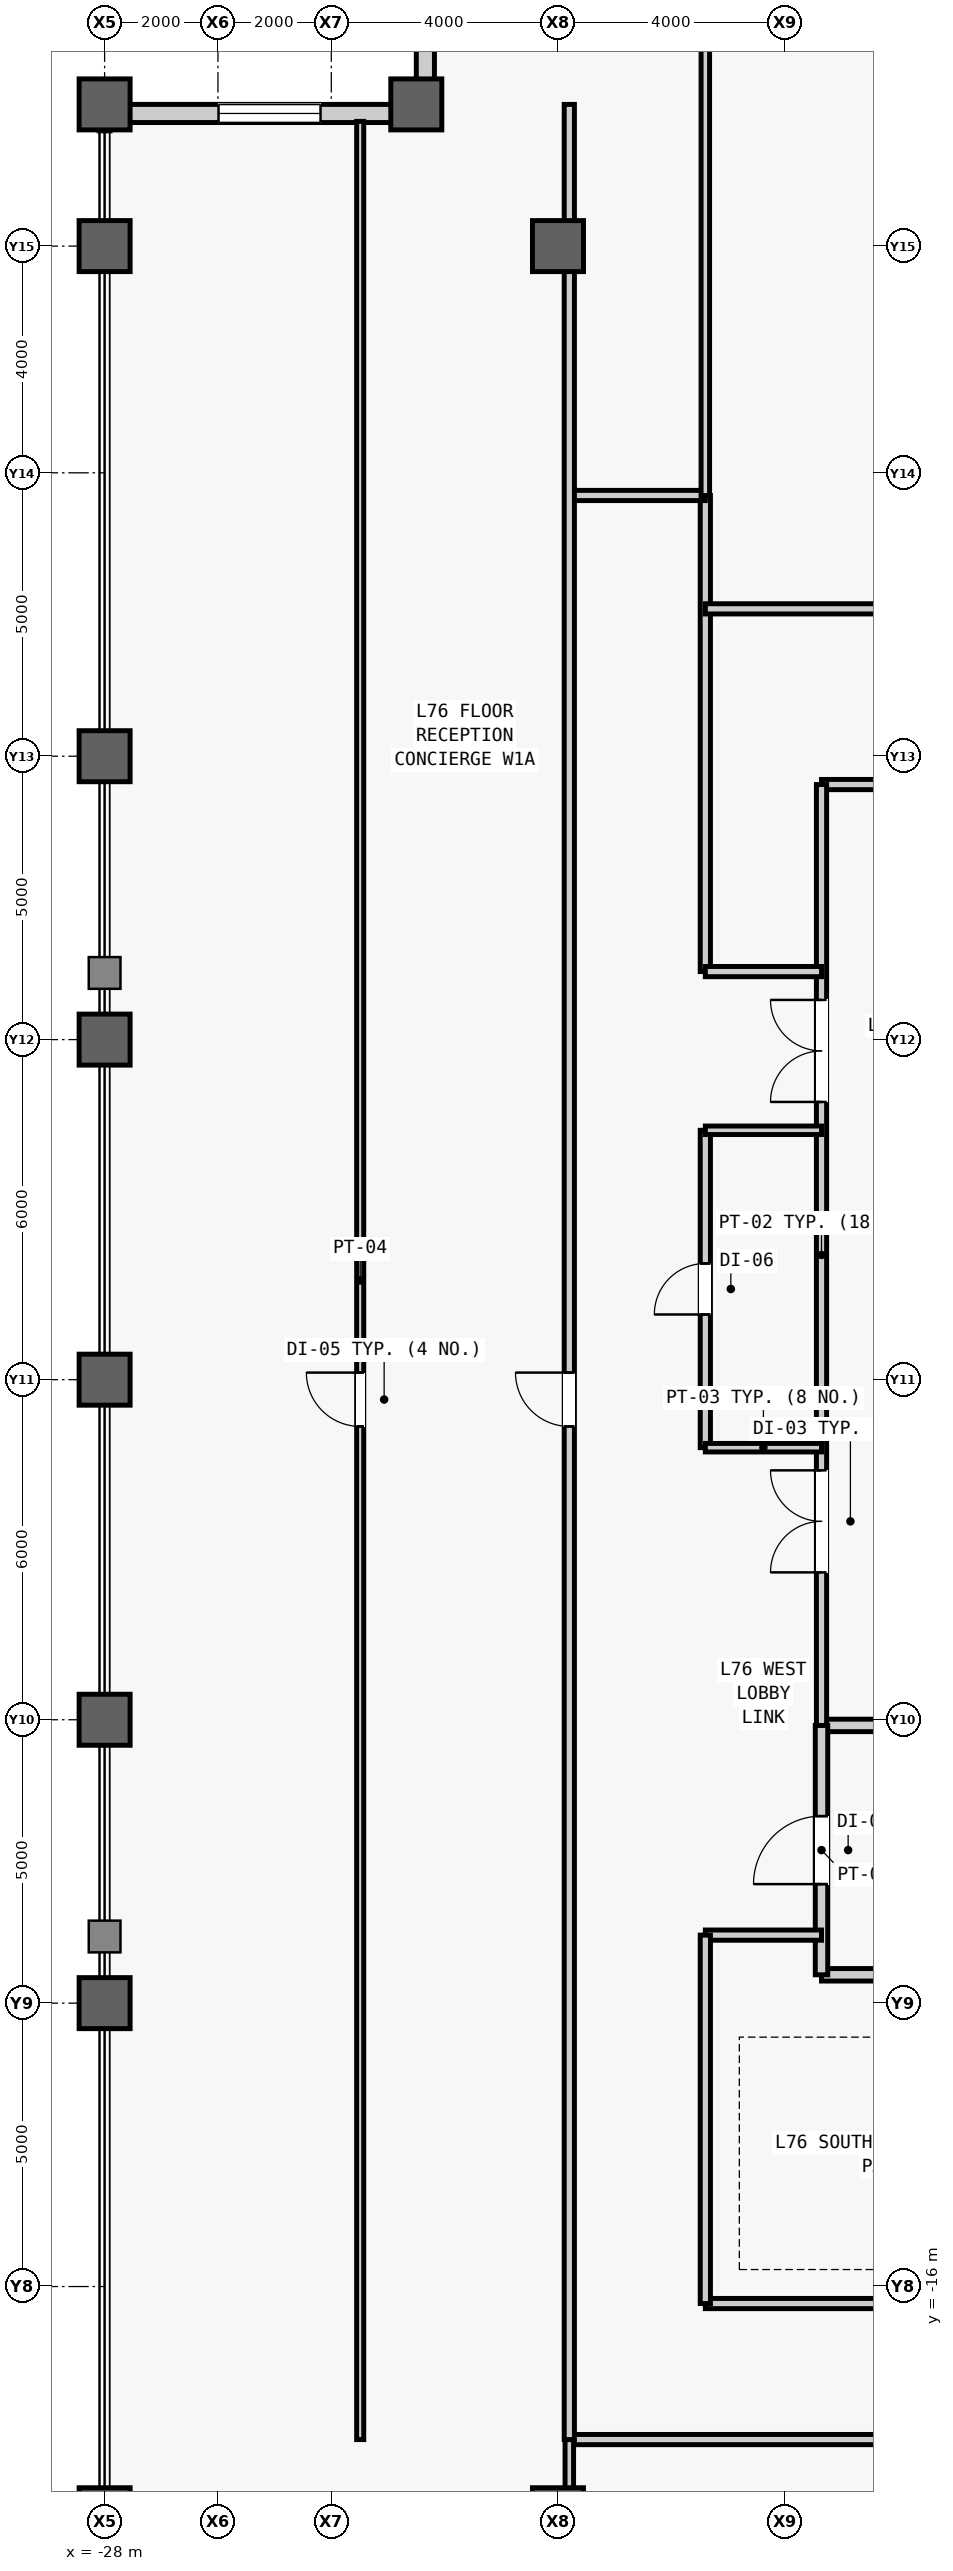
"""IFC4 building model, lengths in metres.
Left out: names, types, materials, properties, quantities, classifications, styles, units other than length and angle.
Written with IfcOpenShell. Run it as: python <this file> out.ifc"""

import sys

from ifc_helpers import new_model, si_unit, direction, frame, frame_2d, origin, origin_2d, place, context, subcontext, project, spatial, rectangle, hollow_rectangle, extrude, source, transform, mapped, element, fill, save


model = new_model("IFC4")
c1 = context("Model", 3, precision=1e-05, world=origin(), true_north=direction((0.0, 1.0)))
c2 = subcontext(c1, "Body", "Model", "MODEL_VIEW")
j1 = project(units=[si_unit("LENGTHUNIT", "METRE"), si_unit("PLANEANGLEUNIT", "RADIAN")], contexts=[c1])
p1 = place(None, origin())
s1 = spatial("IfcSite", under=j1, at=p1, CompositionType="ELEMENT")
p2 = place(p1, origin())
s2 = spatial("IfcBuilding", under=s1, at=p2, CompositionType="ELEMENT")
p3 = place(p2, frame((0.0, 0.0, 321.5)))
s3 = spatial("IfcBuildingStorey", under=s2, at=p3, CompositionType="ELEMENT", Elevation=321.5)
m1 = source(origin(), c2, "Body", "SweptSolid", [
    extrude(hollow_rectangle(XDim=0.9, YDim=0.9, WallThickness=0.05, at=origin_2d()), origin(), (0.0, 0.0, 1.0), 4.8),
])
for number, where, z_axis, x_axis in (
    (1, (-28.0, -20.0, 0.0), (0.0, 0.0, 1.0), (1.0, 0.0, 0.0)),
    (2, (-28.0, -11.0, 0.0), (0.0, 0.0, 1.0), (1.0, 0.0, 0.0)),
    (3, (-28.0, -6.0, 0.0), (0.0, 0.0, 1.0), (1.0, 0.0, 0.0)),
    (4, (-28.0, 0.0, 0.0), (0.0, 0.0, 1.0), (1.0, 0.0, 0.0)),
    (5, (-28.0, 6.0, 0.0), (0.0, 0.0, 1.0), (1.0, 0.0, 0.0)),
    (6, (-28.0, 11.0, 0.0), (0.0, 0.0, 1.0), (1.0, 0.0, 0.0)),
    (7, (-28.0, 20.0, 0.0), (0.0, 0.0, 1.0), (1.0, 0.0, 0.0)),
    (8, (-28.0, 22.5, 0.0), (0.0, 0.0, 1.0), (1.0, 0.0, 0.0)),
    (9, (-22.5, 22.5, 0.0), (0.0, 0.0, 1.0), (1.0, 0.0, 0.0)),
    (10, (-20.0, -20.0, 0.0), (0.0, 0.0, 1.0), (1.0, 0.0, 0.0)),
    (11, (-20.0, 20.0, 0.0), (0.0, 0.0, 1.0), (1.0, 0.0, 0.0)),
):
    element("IfcColumn", number, at=place(p3, frame(where, z_axis=z_axis, x_axis=x_axis)), inside=s3, PredefinedType="COLUMN", context=c2, shape_type="MappedRepresentation", body=[
        mapped(m1, transform((0.0, 0.0, 0.0), scale=1.0)),
    ])
m2 = source(origin(), c2, "Body", "SweptSolid", [
    extrude(rectangle(XDim=5.18, YDim=0.32, at=frame_2d((2.59, 0.0))), origin(), (0.0, 0.0, 1.0), 3.991),
])
p4 = place(p3, frame((-22.34, 22.5, 0.0), z_axis=(0.0, 0.0, 1.0), x_axis=(0.0, 1.0, 0.0)))
e12 = element("IfcWall", 12, at=p4, inside=s3, PredefinedType="STANDARD", context=c2, shape_type="MappedRepresentation", body=[
    mapped(m2, transform((0.0, 0.0, 0.0), scale=1.0)),
])
m3 = source(origin(), c2, "Body", "SweptSolid", [
    extrude(rectangle(XDim=1.8, YDim=2.4, at=frame_2d((0.9, 1.2))), frame((0.0, 0.17, 0.0), z_axis=(0.0, -1.0, 0.0), x_axis=(1.0, 0.0, 0.0)), (0.0, 0.0, 1.0), 0.34),
])
p5 = place(p4, frame((1.69, 0.0, 0.7)))
e13 = element("IfcOpeningElement", 13, at=p5, cuts=e12, PredefinedType="OPENING", context=c2, shape_type="MappedRepresentation", body=[
    mapped(m3, transform((0.0, 0.0, 0.0), scale=1.0)),
])
p6 = place(p3, frame((-22.5, 22.34, 0.0), z_axis=(0.0, 0.0, 1.0), x_axis=(-1.0, 0.0, 0.0)))
e14 = element("IfcWall", 14, at=p6, inside=s3, PredefinedType="STANDARD", context=c2, shape_type="MappedRepresentation", body=[
    mapped(m2, transform((0.0, 0.0, 0.0), scale=1.0)),
])
p7 = place(p6, frame((1.69, 0.0, 0.7)))
e15 = element("IfcOpeningElement", 15, at=p7, cuts=e14, PredefinedType="OPENING", context=c2, shape_type="MappedRepresentation", body=[
    mapped(m3, transform((0.0, 0.0, 0.0), scale=1.0)),
])
m4 = source(origin(), c2, "Body", "SweptSolid", [
    extrude(rectangle(XDim=4.05, YDim=0.22, at=frame_2d((2.025, 0.0))), origin(), (0.0, 0.0, 1.0), 4.54),
])
p8 = place(p3, frame((-15.35, -10.5, 0.0), z_axis=(0.0, 0.0, 1.0), x_axis=(1.0, 0.0, 0.0)))
e16 = element("IfcWall", 16, at=p8, inside=s3, PredefinedType="PARTITIONING", context=c2, shape_type="MappedRepresentation", body=[
    mapped(m4, transform((0.0, 0.0, 0.0), scale=1.0)),
])
m5 = source(origin(), c2, "Body", "SweptSolid", [
    extrude(rectangle(XDim=4.05, YDim=0.22, at=frame_2d((2.025, 0.0))), origin(), (0.0, 0.0, 1.0), 2.74),
])
p9 = place(p3, frame((-15.35, -6.1, 0.0), z_axis=(0.0, 0.0, 1.0), x_axis=(1.0, 0.0, 0.0)))
e17 = element("IfcWall", 17, at=p9, inside=s3, PredefinedType="PARTITIONING", context=c2, shape_type="MappedRepresentation", body=[
    mapped(m5, transform((0.0, 0.0, 0.0), scale=1.0)),
])
m6 = source(origin(), c2, "Body", "SweptSolid", [
    extrude(rectangle(XDim=4.4, YDim=0.22, at=frame_2d((2.2, 0.0))), origin(), (0.0, 0.0, 1.0), 4.54),
])
p10 = place(p3, frame((-15.35, -10.5, 0.0), z_axis=(0.0, 0.0, 1.0), x_axis=(0.0, 1.0, 0.0)))
e18 = element("IfcWall", 18, at=p10, inside=s3, PredefinedType="PARTITIONING", context=c2, shape_type="MappedRepresentation", body=[
    mapped(m6, transform((0.0, 0.0, 0.0), scale=1.0)),
])
m7 = source(origin(), c2, "Body", "SweptSolid", [
    extrude(rectangle(XDim=1.2, YDim=2.2, at=frame_2d((0.6, 1.1))), frame((0.0, 0.12, 0.0), z_axis=(0.0, -1.0, 0.0), x_axis=(1.0, 0.0, 0.0)), (0.0, 0.0, 1.0), 0.24),
])
p11 = place(p10, frame((1.6, 0.0, 0.0)))
e19 = element("IfcOpeningElement", 19, at=p11, cuts=e18, PredefinedType="OPENING", context=c2, shape_type="MappedRepresentation", body=[
    mapped(m7, transform((0.0, 0.0, 0.0), scale=1.0)),
])
m8 = source(origin(), c2, "Body", "SweptSolid", [
    extrude(rectangle(XDim=4.05, YDim=0.18, at=frame_2d((2.025, 0.0))), origin(), (0.0, 0.0, 1.0), 4.54),
])
p12 = place(p3, frame((-15.35, 10.5, 0.0), z_axis=(0.0, 0.0, 1.0), x_axis=(1.0, 0.0, 0.0)))
e20 = element("IfcWall", 20, at=p12, inside=s3, PredefinedType="PARTITIONING", context=c2, shape_type="MappedRepresentation", body=[
    mapped(m8, transform((0.0, 0.0, 0.0), scale=1.0)),
])
m9 = source(origin(), c2, "Body", "SweptSolid", [
    extrude(rectangle(XDim=16.6, YDim=0.18, at=frame_2d((8.3, 0.0))), origin(), (0.0, 0.0, 1.0), 4.54),
])
p13 = place(p3, frame((-15.35, -6.1, 0.0), z_axis=(0.0, 0.0, 1.0), x_axis=(0.0, 1.0, 0.0)))
e21 = element("IfcWall", 21, at=p13, inside=s3, PredefinedType="PARTITIONING", context=c2, shape_type="MappedRepresentation", body=[
    mapped(m9, transform((0.0, 0.0, 0.0), scale=1.0)),
])
m10 = source(origin(), c2, "Body", "SweptSolid", [
    extrude(rectangle(XDim=1.8, YDim=2.25, at=frame_2d((0.9, 1.125))), frame((0.0, 0.1, 0.0), z_axis=(0.0, -1.0, 0.0), x_axis=(1.0, 0.0, 0.0)), (0.0, 0.0, 1.0), 0.2),
])
p14 = place(p13, frame((2.7, 0.0, 0.0)))
e22 = element("IfcOpeningElement", 22, at=p14, cuts=e21, PredefinedType="OPENING", context=c2, shape_type="MappedRepresentation", body=[
    mapped(m10, transform((0.0, 0.0, 0.0), scale=1.0)),
])
p15 = place(p13, frame((11.0, 0.0, 0.0)))
e23 = element("IfcOpeningElement", 23, at=p15, cuts=e21, PredefinedType="OPENING", context=c2, shape_type="MappedRepresentation", body=[
    mapped(m10, transform((0.0, 0.0, 0.0), scale=1.0)),
])
m11 = source(origin(), c2, "Body", "SweptSolid", [
    extrude(rectangle(XDim=5.6, YDim=0.18, at=frame_2d((2.8, 0.0))), origin(), (0.0, 0.0, 1.0), 4.54),
])
p16 = place(p3, frame((-17.4, -1.2, 0.0), z_axis=(0.0, 0.0, 1.0), x_axis=(0.0, 1.0, 0.0)))
e24 = element("IfcWall", 24, at=p16, inside=s3, PredefinedType="PARTITIONING", context=c2, shape_type="MappedRepresentation", body=[
    mapped(m11, transform((0.0, 0.0, 0.0), scale=1.0)),
])
m12 = source(origin(), c2, "Body", "SweptSolid", [
    extrude(rectangle(XDim=0.9, YDim=2.15, at=frame_2d((0.45, 1.075))), frame((0.0, 0.1, 0.0), z_axis=(0.0, -1.0, 0.0), x_axis=(1.0, 0.0, 0.0)), (0.0, 0.0, 1.0), 0.2),
])
p17 = place(p16, frame((2.35, 0.0, 0.0)))
e25 = element("IfcOpeningElement", 25, at=p17, cuts=e24, PredefinedType="OPENING", context=c2, shape_type="MappedRepresentation", body=[
    mapped(m12, transform((0.0, 0.0, 0.0), scale=1.0)),
])
m13 = source(origin(), c2, "Body", "SweptSolid", [
    extrude(rectangle(XDim=2.05, YDim=0.15, at=frame_2d((1.025, 0.0))), origin(), (0.0, 0.0, 1.0), 4.54),
])
for number, where, z_axis, x_axis in (
    (26, (-17.4, -1.2, 0.0), (0.0, 0.0, 1.0), (1.0, 0.0, 0.0)),
    (27, (-17.4, 4.4, 0.0), (0.0, 0.0, 1.0), (1.0, 0.0, 0.0)),
):
    element("IfcWall", number, at=place(p3, frame(where, z_axis=z_axis, x_axis=x_axis)), inside=s3, PredefinedType="PARTITIONING", context=c2, shape_type="MappedRepresentation", body=[
        mapped(m13, transform((0.0, 0.0, 0.0), scale=1.0)),
    ])
m14 = source(origin(), c2, "Body", "SweptSolid", [
    extrude(rectangle(XDim=2.05, YDim=0.18, at=frame_2d((1.025, 0.0))), origin(), (0.0, 0.0, 1.0), 4.54),
])
p18 = place(p3, frame((-17.4, -9.8, 0.0), z_axis=(0.0, 0.0, 1.0), x_axis=(1.0, 0.0, 0.0)))
e28 = element("IfcWall", 28, at=p18, inside=s3, PredefinedType="PARTITIONING", context=c2, shape_type="MappedRepresentation", body=[
    mapped(m14, transform((0.0, 0.0, 0.0), scale=1.0)),
])
m15 = source(origin(), c2, "Body", "SweptSolid", [
    extrude(rectangle(XDim=8.4, YDim=0.18, at=frame_2d((4.2, 0.0))), origin(), (0.0, 0.0, 1.0), 4.54),
])
p19 = place(p3, frame((-17.4, 7.2, 0.0), z_axis=(0.0, 0.0, 1.0), x_axis=(0.0, 1.0, 0.0)))
e29 = element("IfcWall", 29, at=p19, inside=s3, PredefinedType="PARTITIONING", context=c2, shape_type="MappedRepresentation", body=[
    mapped(m15, transform((0.0, 0.0, 0.0), scale=1.0)),
])
p20 = place(p3, frame((-17.4, 7.2, 0.0), z_axis=(0.0, 0.0, 1.0), x_axis=(1.0, 0.0, 0.0)))
e30 = element("IfcWall", 30, at=p20, inside=s3, PredefinedType="PARTITIONING", context=c2, shape_type="MappedRepresentation", body=[
    mapped(m14, transform((0.0, 0.0, 0.0), scale=1.0)),
])
m16 = source(origin(), c2, "Body", "SweptSolid", [
    extrude(rectangle(XDim=16.1, YDim=0.18, at=frame_2d((8.05, 0.0))), origin(), (0.0, 0.0, 1.0), 4.54),
])
p21 = place(p3, frame((-17.4, -16.3, 0.0), z_axis=(0.0, 0.0, 1.0), x_axis=(1.0, 0.0, 0.0)))
e31 = element("IfcWall", 31, at=p21, inside=s3, PredefinedType="PARTITIONING", context=c2, shape_type="MappedRepresentation", body=[
    mapped(m16, transform((0.0, 0.0, 0.0), scale=1.0)),
])
p22 = place(p21, frame((8.95, 0.0, 0.0)))
e32 = element("IfcOpeningElement", 32, at=p22, cuts=e31, PredefinedType="OPENING", context=c2, shape_type="MappedRepresentation", body=[
    mapped(m12, transform((0.0, 0.0, 0.0), scale=1.0)),
])
m17 = source(origin(), c2, "Body", "SweptSolid", [
    extrude(rectangle(XDim=6.5, YDim=0.18, at=frame_2d((3.25, 0.0))), origin(), (0.0, 0.0, 1.0), 4.54),
])
p23 = place(p3, frame((-17.4, -16.3, 0.0), z_axis=(0.0, 0.0, 1.0), x_axis=(0.0, 1.0, 0.0)))
e33 = element("IfcWall", 33, at=p23, inside=s3, PredefinedType="PARTITIONING", context=c2, shape_type="MappedRepresentation", body=[
    mapped(m17, transform((0.0, 0.0, 0.0), scale=1.0)),
])
m18 = source(origin(), c2, "Body", "SweptSolid", [
    extrude(rectangle(XDim=2.4, YDim=0.18, at=frame_2d((1.2, 0.0))), origin(), (0.0, 0.0, 1.0), 4.54),
])
p24 = place(p3, frame((-19.8, 15.6, 0.0), z_axis=(0.0, 0.0, 1.0), x_axis=(1.0, 0.0, 0.0)))
e34 = element("IfcWall", 34, at=p24, inside=s3, PredefinedType="PARTITIONING", context=c2, shape_type="MappedRepresentation", body=[
    mapped(m18, transform((0.0, 0.0, 0.0), scale=1.0)),
])
m19 = source(origin(), c2, "Body", "SweptSolid", [
    extrude(rectangle(XDim=37.55, YDim=0.18, at=frame_2d((18.775, 0.0))), origin(), (0.0, 0.0, 1.0), 4.54),
])
p25 = place(p3, frame((-19.8, -18.7, 0.0), z_axis=(0.0, 0.0, 1.0), x_axis=(1.0, 0.0, 0.0)))
e35 = element("IfcWall", 35, at=p25, inside=s3, PredefinedType="PARTITIONING", context=c2, shape_type="MappedRepresentation", body=[
    mapped(m19, transform((0.0, 0.0, 0.0), scale=1.0)),
])
m20 = source(origin(), c2, "Body", "SweptSolid", [
    extrude(rectangle(XDim=1.05, YDim=2.2, at=frame_2d((0.525, 1.1))), frame((0.0, 0.1, 0.0), z_axis=(0.0, -1.0, 0.0), x_axis=(1.0, 0.0, 0.0)), (0.0, 0.0, 1.0), 0.2),
])
p26 = place(p25, frame((6.734, 0.0, 0.0)))
e36 = element("IfcOpeningElement", 36, at=p26, cuts=e35, PredefinedType="OPENING", context=c2, shape_type="MappedRepresentation", body=[
    mapped(m20, transform((0.0, 0.0, 0.0), scale=1.0)),
])
p27 = place(p25, frame((19.376, 0.0, 0.0)))
e37 = element("IfcOpeningElement", 37, at=p27, cuts=e35, PredefinedType="OPENING", context=c2, shape_type="MappedRepresentation", body=[
    mapped(m20, transform((0.0, 0.0, 0.0), scale=1.0)),
])
p28 = place(p25, frame((30.867, 0.0, 0.0)))
e38 = element("IfcOpeningElement", 38, at=p28, cuts=e35, PredefinedType="OPENING", context=c2, shape_type="MappedRepresentation", body=[
    mapped(m20, transform((0.0, 0.0, 0.0), scale=1.0)),
])
m21 = source(origin(), c2, "Body", "SweptSolid", [
    extrude(rectangle(XDim=9.3, YDim=0.15, at=frame_2d((4.65, 0.0))), origin(), (0.0, 0.0, 1.0), 2.7),
])
p29 = place(p3, frame((-19.8, -28.0, 0.0), z_axis=(0.0, 0.0, 1.0), x_axis=(0.0, 1.0, 0.0)))
e39 = element("IfcWall", 39, at=p29, inside=s3, PredefinedType="PARTITIONING", context=c2, shape_type="MappedRepresentation", body=[
    mapped(m21, transform((0.0, 0.0, 0.0), scale=1.0)),
])
m22 = source(origin(), c2, "Body", "SweptSolid", [
    extrude(rectangle(XDim=32.75, YDim=0.18, at=frame_2d((16.375, 0.0))), origin(), (0.0, 0.0, 1.0), 4.54),
])
p30 = place(p3, frame((-17.4, 13.6, 0.0), z_axis=(0.0, 0.0, 1.0), x_axis=(1.0, 0.0, 0.0)))
e40 = element("IfcWall", 40, at=p30, inside=s3, PredefinedType="PARTITIONING", context=c2, shape_type="MappedRepresentation", body=[
    mapped(m22, transform((0.0, 0.0, 0.0), scale=1.0)),
])
p31 = place(p30, frame((27.075, 0.0, 0.0)))
e41 = element("IfcOpeningElement", 41, at=p31, cuts=e40, PredefinedType="OPENING", context=c2, shape_type="MappedRepresentation", body=[
    mapped(m20, transform((0.0, 0.0, 0.0), scale=1.0)),
])
m23 = source(origin(), c2, "Body", "SweptSolid", [
    extrude(rectangle(XDim=12.4, YDim=0.15, at=frame_2d((6.2, 0.0))), origin(), (0.0, 0.0, 1.0), 4.54),
])
p32 = place(p3, frame((-17.4, 15.6, 0.0), z_axis=(0.0, 0.0, 1.0), x_axis=(0.0, 1.0, 0.0)))
e42 = element("IfcWall", 42, at=p32, inside=s3, PredefinedType="PARTITIONING", context=c2, shape_type="MappedRepresentation", body=[
    mapped(m23, transform((0.0, 0.0, 0.0), scale=1.0)),
])
m24 = source(origin(), c2, "Body", "SweptSolid", [
    extrude(rectangle(XDim=40.9, YDim=0.125, at=frame_2d((20.45, 0.0))), origin(), (0.0, 0.0, 1.0), 4.54),
])
p33 = place(p3, frame((-23.49, -18.7, 0.0), z_axis=(0.0, 0.0, 1.0), x_axis=(0.0, 1.0, 0.0)))
e43 = element("IfcWall", 43, at=p33, inside=s3, PredefinedType="PARTITIONING", context=c2, shape_type="MappedRepresentation", body=[
    mapped(m24, transform((0.0, 0.0, 0.0), scale=1.0)),
])
m25 = source(origin(), c2, "Body", "SweptSolid", [
    extrude(rectangle(XDim=0.95, YDim=2.15, at=frame_2d((0.475, 1.075))), frame((0.0, 0.073, 0.0), z_axis=(0.0, -1.0, 0.0), x_axis=(1.0, 0.0, 0.0)), (0.0, 0.0, 1.0), 0.145),
])
p34 = place(p33, frame((17.875, 0.0, 0.0)))
e44 = element("IfcOpeningElement", 44, at=p34, cuts=e43, PredefinedType="OPENING", context=c2, shape_type="MappedRepresentation", body=[
    mapped(m25, transform((0.0, 0.0, 0.0), scale=1.0)),
])
m26 = source(origin(), c2, "Body", "SweptSolid", [
    extrude(rectangle(XDim=41.2, YDim=0.18, at=frame_2d((20.6, 0.0))), origin(), (0.0, 0.0, 1.0), 2.7),
])
p35 = place(p3, frame((-19.8, -18.7, 0.0), z_axis=(0.0, 0.0, 1.0), x_axis=(0.0, 1.0, 0.0)))
e45 = element("IfcWall", 45, at=p35, inside=s3, PredefinedType="PARTITIONING", context=c2, shape_type="MappedRepresentation", body=[
    mapped(m26, transform((0.0, 0.0, 0.0), scale=1.0)),
])
m27 = source(origin(), c2, "Body", "SweptSolid", [
    extrude(rectangle(XDim=0.95, YDim=2.15, at=frame_2d((0.475, 1.075))), frame((0.0, 0.1, 0.0), z_axis=(0.0, -1.0, 0.0), x_axis=(1.0, 0.0, 0.0)), (0.0, 0.0, 1.0), 0.2),
])
p36 = place(p35, frame((17.875, 0.0, 0.0)))
e46 = element("IfcOpeningElement", 46, at=p36, cuts=e45, PredefinedType="OPENING", context=c2, shape_type="MappedRepresentation", body=[
    mapped(m27, transform((0.0, 0.0, 0.0), scale=1.0)),
])
m28 = source(origin(), c2, "Body", "SweptSolid", [
    extrude(rectangle(XDim=1.8, YDim=2.4, at=frame_2d((0.9, 1.2))), frame((0.0, 0.03, 0.0), z_axis=(0.0, -1.0, 0.0), x_axis=(1.0, 0.0, 0.0)), (0.0, 0.0, 1.0), 0.06),
])
p37 = place(p7, origin())
e47 = element("IfcWindow", 47, at=p37, inside=s3, PartitioningType="SINGLE_PANEL", PredefinedType="WINDOW", context=c2, shape_type="MappedRepresentation", body=[
    mapped(m28, transform((0.0, 0.0, 0.0), scale=1.0)),
])
fill(e15, e47)
m29 = source(origin(), c2, "Body", "SweptSolid", [
    extrude(rectangle(XDim=1.2, YDim=2.2, at=frame_2d((0.6, 1.1))), frame((0.0, 0.025, 0.0), z_axis=(0.0, -1.0, 0.0), x_axis=(1.0, 0.0, 0.0)), (0.0, 0.0, 1.0), 0.05),
])
p38 = place(p11, origin())
e48 = element("IfcDoor", 48, at=p38, inside=s3, OperationType="SINGLE_SWING_LEFT", PredefinedType="DOOR", context=c2, shape_type="MappedRepresentation", body=[
    mapped(m29, transform((0.0, 0.0, 0.0), scale=1.0)),
])
fill(e19, e48)
m30 = source(origin(), c2, "Body", "SweptSolid", [
    extrude(rectangle(XDim=1.8, YDim=2.25, at=frame_2d((0.9, 1.125))), frame((0.0, 0.025, 0.0), z_axis=(0.0, -1.0, 0.0), x_axis=(1.0, 0.0, 0.0)), (0.0, 0.0, 1.0), 0.05),
])
p39 = place(p14, origin())
e49 = element("IfcDoor", 49, at=p39, inside=s3, OperationType="SINGLE_SWING_LEFT", PredefinedType="DOOR", context=c2, shape_type="MappedRepresentation", body=[
    mapped(m30, transform((0.0, 0.0, 0.0), scale=1.0)),
])
fill(e22, e49)
p40 = place(p15, origin())
e50 = element("IfcDoor", 50, at=p40, inside=s3, OperationType="SINGLE_SWING_RIGHT", PredefinedType="DOOR", context=c2, shape_type="MappedRepresentation", body=[
    mapped(m30, transform((0.0, 0.0, 0.0), scale=1.0)),
])
fill(e23, e50)
m31 = source(origin(), c2, "Body", "SweptSolid", [
    extrude(rectangle(XDim=0.9, YDim=2.15, at=frame_2d((0.45, 1.075))), frame((0.0, 0.025, 0.0), z_axis=(0.0, -1.0, 0.0), x_axis=(1.0, 0.0, 0.0)), (0.0, 0.0, 1.0), 0.05),
])
p41 = place(p17, origin())
e51 = element("IfcDoor", 51, at=p41, inside=s3, OperationType="SINGLE_SWING_LEFT", PredefinedType="DOOR", context=c2, shape_type="MappedRepresentation", body=[
    mapped(m31, transform((0.0, 0.0, 0.0), scale=1.0)),
])
fill(e25, e51)
m32 = source(origin(), c2, "Body", "SweptSolid", [
    extrude(rectangle(XDim=0.95, YDim=2.15, at=frame_2d((0.475, 1.075))), frame((0.0, 0.025, 0.0), z_axis=(0.0, -1.0, 0.0), x_axis=(1.0, 0.0, 0.0)), (0.0, 0.0, 1.0), 0.05),
])
p42 = place(p34, origin())
e52 = element("IfcDoor", 52, at=p42, inside=s3, OperationType="SINGLE_SWING_RIGHT", PredefinedType="DOOR", context=c2, shape_type="MappedRepresentation", body=[
    mapped(m32, transform((0.0, 0.0, 0.0), scale=1.0)),
])
fill(e44, e52)
p43 = place(p36, origin())
e53 = element("IfcDoor", 53, at=p43, inside=s3, OperationType="SINGLE_SWING_RIGHT", PredefinedType="DOOR", context=c2, shape_type="MappedRepresentation", body=[
    mapped(m32, transform((0.0, 0.0, 0.0), scale=1.0)),
])
fill(e46, e53)
save(model, sys.argv[1])
